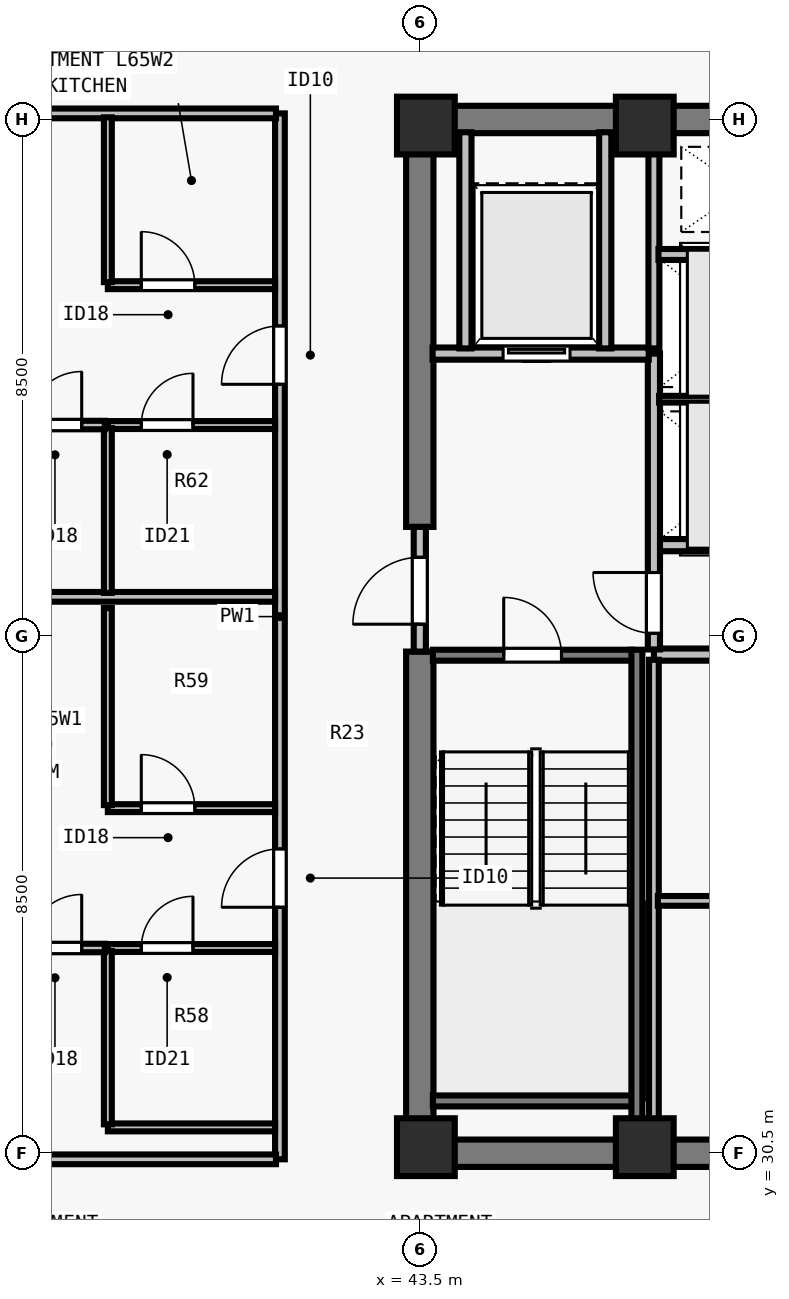
"""IFC4 building model, lengths in metres.
Left out: names, types, materials, properties, quantities, classifications, styles, units other than length and angle.
Written with IfcOpenShell. Run it as: python <this file> out.ifc"""

import sys

from ifc_helpers import new_model, si_unit, direction, frame, frame_2d, origin, origin_2d, place, context, subcontext, project, spatial, rectangle, extrude, element, fill, save


model = new_model("IFC4")
c1 = context("Model", 3, precision=1e-05, world=origin(), true_north=direction((0.0, 1.0)))
c2 = subcontext(c1, "Body", "Model", "MODEL_VIEW")
j1 = project(units=[si_unit("LENGTHUNIT", "METRE"), si_unit("PLANEANGLEUNIT", "RADIAN")], contexts=[c1])
p1 = place(None, origin())
s1 = spatial("IfcSite", under=j1, at=p1, CompositionType="ELEMENT")
p2 = place(p1, origin())
s2 = spatial("IfcBuilding", under=s1, at=p2, CompositionType="ELEMENT")
p3 = place(p2, frame((0.0, 0.0, 237.5)))
s3 = spatial("IfcBuildingStorey", under=s2, at=p3, CompositionType="ELEMENT", Elevation=237.5)
for number, where, z_axis, x_axis in (
    (1, (43.6, 30.6, 0.0), (0.0, 0.0, 1.0), (1.0, 0.0, 0.0)),
    (2, (47.2, 30.6, 0.0), (0.0, 0.0, 1.0), (1.0, 0.0, 0.0)),
    (3, (43.6, 47.4, 0.0), (0.0, 0.0, 1.0), (1.0, 0.0, 0.0)),
    (4, (47.2, 47.4, 0.0), (0.0, 0.0, 1.0), (1.0, 0.0, 0.0)),
):
    element("IfcColumn", number, at=place(p3, frame(where, z_axis=z_axis, x_axis=x_axis)), inside=s3, PredefinedType="COLUMN", context=c2, shape_type="SweptSolid", body=[
        extrude(rectangle(XDim=0.95, YDim=0.95, at=origin_2d()), origin(), (0.0, 0.0, 1.0), 3.5),
    ])
for number, where, z_axis, x_axis in (
    (5, (43.275, 30.5, 0.0), (0.0, 0.0, 1.0), (1.0, 0.0, 0.0)),
    (6, (43.275, 47.5, 0.0), (0.0, 0.0, 1.0), (1.0, 0.0, 0.0)),
):
    element("IfcWall", number, at=place(p3, frame(where, z_axis=z_axis, x_axis=x_axis)), inside=s3, PredefinedType="SHEAR", context=c2, shape_type="SweptSolid", body=[
        extrude(rectangle(XDim=17.45, YDim=0.45, at=frame_2d((8.725, 0.0))), origin(), (0.0, 0.0, 1.0), 3.29),
    ])
p4 = place(p3, frame((43.5, 30.715, 0.0), z_axis=(0.0, 0.0, 1.0), x_axis=(0.0, 1.0, 0.0)))
e7 = element("IfcWall", 7, at=p4, inside=s3, PredefinedType="SHEAR", context=c2, shape_type="SweptSolid", body=[
    extrude(rectangle(XDim=8.035, YDim=0.45, at=frame_2d((4.018, 0.0))), origin(), (0.0, 0.0, 1.0), 3.29),
])
p5 = place(p3, frame((43.5, 40.8, 0.0), z_axis=(0.0, 0.0, 1.0), x_axis=(0.0, 1.0, 0.0)))
e8 = element("IfcWall", 8, at=p5, inside=s3, PredefinedType="SHEAR", context=c2, shape_type="SweptSolid", body=[
    extrude(rectangle(XDim=6.485, YDim=0.45, at=frame_2d((3.242, 0.0))), origin(), (0.0, 0.0, 1.0), 3.29),
])
for number, where, z_axis, x_axis in (
    (9, (47.35, 38.7, 0.0), (0.0, 0.0, 1.0), (1.0, 0.0, 0.0)),
    (10, (47.35, 40.5, 0.0), (0.0, 0.0, 1.0), (1.0, 0.0, 0.0)),
):
    element("IfcWall", number, at=place(p3, frame(where, z_axis=z_axis, x_axis=x_axis)), inside=s3, PredefinedType="SOLIDWALL", context=c2, shape_type="SweptSolid", body=[
        extrude(rectangle(XDim=2.95, YDim=0.2, at=frame_2d((1.475, 0.0))), origin(), (0.0, 0.0, 1.0), 3.29),
    ])
p6 = place(p3, frame((43.5, 38.75, 0.0), z_axis=(0.0, 0.0, 1.0), x_axis=(0.0, 1.0, 0.0)))
e11 = element("IfcWall", 11, at=p6, inside=s3, PredefinedType="SOLIDWALL", context=c2, shape_type="SweptSolid", body=[
    extrude(rectangle(XDim=2.05, YDim=0.2, at=frame_2d((1.025, 0.0))), origin(), (0.0, 0.0, 1.0), 3.29),
])
p7 = place(p6, frame((0.45, 0.0, 0.0)))
e12 = element("IfcOpeningElement", 12, at=p7, cuts=e11, PredefinedType="OPENING", context=c2, shape_type="SweptSolid", body=[
    extrude(rectangle(XDim=1.1, YDim=2.15, at=frame_2d((0.55, 1.075))), frame((0.0, 0.11, 0.0), z_axis=(0.0, -1.0, 0.0), x_axis=(1.0, 0.0, 0.0)), (0.0, 0.0, 1.0), 0.22),
])
p8 = place(p3, frame((47.35, 38.785, 0.0), z_axis=(0.0, 0.0, 1.0), x_axis=(0.0, 1.0, 0.0)))
e13 = element("IfcWall", 13, at=p8, inside=s3, PredefinedType="SOLIDWALL", context=c2, shape_type="SweptSolid", body=[
    extrude(rectangle(XDim=4.865, YDim=0.2, at=frame_2d((2.433, 0.0))), origin(), (0.0, 0.0, 1.0), 3.29),
])
p9 = place(p8, frame((0.265, 0.0, 0.0)))
e14 = element("IfcOpeningElement", 14, at=p9, cuts=e13, PredefinedType="OPENING", context=c2, shape_type="SweptSolid", body=[
    extrude(rectangle(XDim=1.0, YDim=2.15, at=frame_2d((0.5, 1.075))), frame((0.0, 0.11, 0.0), z_axis=(0.0, -1.0, 0.0), x_axis=(1.0, 0.0, 0.0)), (0.0, 0.0, 1.0), 0.22),
])
p10 = place(p3, frame((43.71, 43.65, 0.0), z_axis=(0.0, 0.0, 1.0), x_axis=(1.0, 0.0, 0.0)))
e15 = element("IfcWall", 15, at=p10, inside=s3, PredefinedType="SOLIDWALL", context=c2, shape_type="SweptSolid", body=[
    extrude(rectangle(XDim=3.555, YDim=0.2, at=frame_2d((1.777, 0.0))), origin(), (0.0, 0.0, 1.0), 3.29),
])
p11 = place(p10, frame((1.16, 0.0, 0.0)))
e16 = element("IfcOpeningElement", 16, at=p11, cuts=e15, PredefinedType="OPENING", context=c2, shape_type="SweptSolid", body=[
    extrude(rectangle(XDim=1.1, YDim=2.2, at=frame_2d((0.55, 1.1))), frame((0.0, 0.11, 0.0), z_axis=(0.0, -1.0, 0.0), x_axis=(1.0, 0.0, 0.0)), (0.0, 0.0, 1.0), 0.22),
])
for number, where, z_axis, x_axis in (
    (17, (46.55, 43.735, 0.0), (0.0, 0.0, 1.0), (0.0, 1.0, 0.0)),
    (18, (44.25, 43.735, 0.0), (0.0, 0.0, 1.0), (0.0, 1.0, 0.0)),
):
    element("IfcWall", number, at=place(p3, frame(where, z_axis=z_axis, x_axis=x_axis)), inside=s3, PredefinedType="SOLIDWALL", context=c2, shape_type="SweptSolid", body=[
        extrude(rectangle(XDim=3.555, YDim=0.2, at=frame_2d((1.777, 0.0))), origin(), (0.0, 0.0, 1.0), 3.29),
    ])
p12 = place(p3, frame((47.35, 30.71, 0.0), z_axis=(0.0, 0.0, 1.0), x_axis=(0.0, 1.0, 0.0)))
e19 = element("IfcWall", 19, at=p12, inside=s3, PredefinedType="PARTITIONING", context=c2, shape_type="SweptSolid", body=[
    extrude(rectangle(XDim=7.905, YDim=0.16, at=frame_2d((3.953, 0.0))), origin(), (0.0, 0.0, 1.0), 3.29),
])
p13 = place(p3, frame((47.415, 34.65, 0.0), z_axis=(0.0, 0.0, 1.0), x_axis=(1.0, 0.0, 0.0)))
e20 = element("IfcWall", 20, at=p13, inside=s3, PredefinedType="PARTITIONING", context=c2, shape_type="SweptSolid", body=[
    extrude(rectangle(XDim=2.8, YDim=0.16, at=frame_2d((1.4, 0.0))), origin(), (0.0, 0.0, 1.0), 3.29),
])
p14 = place(p3, frame((47.35, 43.735, 0.0), z_axis=(0.0, 0.0, 1.0), x_axis=(0.0, 1.0, 0.0)))
e21 = element("IfcWall", 21, at=p14, inside=s3, PredefinedType="SOLIDWALL", context=c2, shape_type="SweptSolid", body=[
    extrude(rectangle(XDim=3.555, YDim=0.18, at=frame_2d((1.777, 0.0))), origin(), (0.0, 0.0, 1.0), 3.29),
])
p15 = place(p3, frame((47.435, 42.9, 0.0), z_axis=(0.0, 0.0, 1.0), x_axis=(1.0, 0.0, 0.0)))
e22 = element("IfcWall", 22, at=p15, inside=s3, PredefinedType="PARTITIONING", context=c2, shape_type="SweptSolid", body=[
    extrude(rectangle(XDim=2.78, YDim=0.11, at=frame_2d((1.39, 0.0))), origin(), (0.0, 0.0, 1.0), 3.29),
])
p16 = place(p3, frame((47.425, 45.28, 0.0), z_axis=(0.0, 0.0, 1.0), x_axis=(1.0, 0.0, 0.0)))
e23 = element("IfcWall", 23, at=p16, inside=s3, PredefinedType="SOLIDWALL", context=c2, shape_type="SweptSolid", body=[
    extrude(rectangle(XDim=2.79, YDim=0.18, at=frame_2d((1.395, 0.0))), origin(), (0.0, 0.0, 1.0), 3.29),
])
p17 = place(p3, frame((41.2, 30.4, 0.0), z_axis=(0.0, 0.0, 1.0), x_axis=(0.0, 1.0, 0.0)))
e24 = element("IfcWall", 24, at=p17, inside=s3, PredefinedType="PARTITIONING", context=c2, shape_type="SweptSolid", body=[
    extrude(rectangle(XDim=17.2, YDim=0.16, at=frame_2d((8.6, 0.0))), origin(), (0.0, 0.0, 1.0), 3.29),
])
p18 = place(p17, frame((4.145, 0.0, 0.0)))
e25 = element("IfcOpeningElement", 25, at=p18, cuts=e24, PredefinedType="OPENING", context=c2, shape_type="SweptSolid", body=[
    extrude(rectangle(XDim=0.96, YDim=2.18, at=frame_2d((0.48, 1.09))), frame((0.0, 0.09, 0.0), z_axis=(0.0, -1.0, 0.0), x_axis=(1.0, 0.0, 0.0)), (0.0, 0.0, 1.0), 0.18),
])
p19 = place(p17, frame((12.745, 0.0, 0.0)))
e26 = element("IfcOpeningElement", 26, at=p19, cuts=e24, PredefinedType="OPENING", context=c2, shape_type="SweptSolid", body=[
    extrude(rectangle(XDim=0.96, YDim=2.18, at=frame_2d((0.48, 1.09))), frame((0.0, 0.09, 0.0), z_axis=(0.0, -1.0, 0.0), x_axis=(1.0, 0.0, 0.0)), (0.0, 0.0, 1.0), 0.18),
])
for number, where, z_axis, x_axis in (
    (27, (29.805, 30.4, 0.0), (0.0, 0.0, 1.0), (1.0, 0.0, 0.0)),
    (28, (29.805, 47.6, 0.0), (0.0, 0.0, 1.0), (1.0, 0.0, 0.0)),
):
    element("IfcWall", number, at=place(p3, frame(where, z_axis=z_axis, x_axis=x_axis)), inside=s3, PredefinedType="PARTITIONING", context=c2, shape_type="SweptSolid", body=[
        extrude(rectangle(XDim=11.33, YDim=0.16, at=frame_2d((5.665, 0.0))), origin(), (0.0, 0.0, 1.0), 3.29),
    ])
p20 = place(p3, frame((29.77, 39.65, 0.0), z_axis=(0.0, 0.0, 1.0), x_axis=(1.0, 0.0, 0.0)))
e29 = element("IfcWall", 29, at=p20, inside=s3, PredefinedType="PARTITIONING", context=c2, shape_type="SweptSolid", body=[
    extrude(rectangle(XDim=11.35, YDim=0.16, at=frame_2d((5.675, 0.0))), origin(), (0.0, 0.0, 1.0), 2.958),
])
p21 = place(p3, frame((38.37, 30.925, 0.0), z_axis=(0.0, 0.0, 1.0), x_axis=(1.0, 0.0, 0.0)))
e30 = element("IfcWall", 30, at=p21, inside=s3, PredefinedType="PLUMBINGWALL", context=c2, shape_type="SweptSolid", body=[
    extrude(rectangle(XDim=2.75, YDim=0.13, at=frame_2d((1.375, 0.0))), origin(), (0.0, 0.0, 1.0), 3.29),
])
p22 = place(p3, frame((38.37, 33.875, 0.0), z_axis=(0.0, 0.0, 1.0), x_axis=(1.0, 0.0, 0.0)))
e31 = element("IfcWall", 31, at=p22, inside=s3, PredefinedType="PLUMBINGWALL", context=c2, shape_type="SweptSolid", body=[
    extrude(rectangle(XDim=2.75, YDim=0.13, at=frame_2d((1.375, 0.0))), origin(), (0.0, 0.0, 1.0), 3.29),
])
p23 = place(p22, frame((0.55, 0.0, 0.0)))
e32 = element("IfcOpeningElement", 32, at=p23, cuts=e31, PredefinedType="OPENING", context=c2, shape_type="SweptSolid", body=[
    extrude(rectangle(XDim=0.85, YDim=2.08, at=frame_2d((0.425, 1.04))), frame((0.0, 0.075, 0.0), z_axis=(0.0, -1.0, 0.0), x_axis=(1.0, 0.0, 0.0)), (0.0, 0.0, 1.0), 0.15),
])
p24 = place(p3, frame((38.37, 30.975, 0.0), z_axis=(0.0, 0.0, 1.0), x_axis=(0.0, 1.0, 0.0)))
e33 = element("IfcWall", 33, at=p24, inside=s3, PredefinedType="PLUMBINGWALL", context=c2, shape_type="SweptSolid", body=[
    extrude(rectangle(XDim=2.85, YDim=0.13, at=frame_2d((1.425, 0.0))), origin(), (0.0, 0.0, 1.0), 3.29),
])
p25 = place(p3, frame((38.37, 36.175, 0.0), z_axis=(0.0, 0.0, 1.0), x_axis=(1.0, 0.0, 0.0)))
e34 = element("IfcWall", 34, at=p25, inside=s3, PredefinedType="PLUMBINGWALL", context=c2, shape_type="SweptSolid", body=[
    extrude(rectangle(XDim=2.75, YDim=0.13, at=frame_2d((1.375, 0.0))), origin(), (0.0, 0.0, 1.0), 3.29),
])
p26 = place(p25, frame((0.55, 0.0, 0.0)))
e35 = element("IfcOpeningElement", 35, at=p26, cuts=e34, PredefinedType="OPENING", context=c2, shape_type="SweptSolid", body=[
    extrude(rectangle(XDim=0.88, YDim=2.1, at=frame_2d((0.44, 1.05))), frame((0.0, 0.075, 0.0), z_axis=(0.0, -1.0, 0.0), x_axis=(1.0, 0.0, 0.0)), (0.0, 0.0, 1.0), 0.15),
])
p27 = place(p3, frame((38.37, 36.225, 0.0), z_axis=(0.0, 0.0, 1.0), x_axis=(0.0, 1.0, 0.0)))
e36 = element("IfcWall", 36, at=p27, inside=s3, PredefinedType="PLUMBINGWALL", context=c2, shape_type="SweptSolid", body=[
    extrude(rectangle(XDim=3.24, YDim=0.13, at=frame_2d((1.62, 0.0))), origin(), (0.0, 0.0, 1.0), 3.29),
])
p28 = place(p3, frame((29.88, 33.875, 0.0), z_axis=(0.0, 0.0, 1.0), x_axis=(1.0, 0.0, 0.0)))
e37 = element("IfcWall", 37, at=p28, inside=s3, PredefinedType="PARTITIONING", context=c2, shape_type="SweptSolid", body=[
    extrude(rectangle(XDim=8.44, YDim=0.14, at=frame_2d((4.22, 0.0))), origin(), (0.0, 0.0, 1.0), 2.573),
])
p29 = place(p28, frame((7.18, 0.0, 0.0)))
e38 = element("IfcOpeningElement", 38, at=p29, cuts=e37, PredefinedType="OPENING", context=c2, shape_type="SweptSolid", body=[
    extrude(rectangle(XDim=0.88, YDim=2.1, at=frame_2d((0.44, 1.05))), frame((0.0, 0.08, 0.0), z_axis=(0.0, -1.0, 0.0), x_axis=(1.0, 0.0, 0.0)), (0.0, 0.0, 1.0), 0.16),
])
p30 = place(p3, frame((38.37, 42.475, 0.0), z_axis=(0.0, 0.0, 1.0), x_axis=(1.0, 0.0, 0.0)))
e39 = element("IfcWall", 39, at=p30, inside=s3, PredefinedType="PLUMBINGWALL", context=c2, shape_type="SweptSolid", body=[
    extrude(rectangle(XDim=2.75, YDim=0.13, at=frame_2d((1.375, 0.0))), origin(), (0.0, 0.0, 1.0), 2.958),
])
p31 = place(p30, frame((0.55, 0.0, 0.0)))
e40 = element("IfcOpeningElement", 40, at=p31, cuts=e39, PredefinedType="OPENING", context=c2, shape_type="SweptSolid", body=[
    extrude(rectangle(XDim=0.85, YDim=2.08, at=frame_2d((0.425, 1.04))), frame((0.0, 0.075, 0.0), z_axis=(0.0, -1.0, 0.0), x_axis=(1.0, 0.0, 0.0)), (0.0, 0.0, 1.0), 0.15),
])
p32 = place(p3, frame((38.37, 39.715, 0.0), z_axis=(0.0, 0.0, 1.0), x_axis=(0.0, 1.0, 0.0)))
e41 = element("IfcWall", 41, at=p32, inside=s3, PredefinedType="PLUMBINGWALL", context=c2, shape_type="SweptSolid", body=[
    extrude(rectangle(XDim=2.71, YDim=0.13, at=frame_2d((1.355, 0.0))), origin(), (0.0, 0.0, 1.0), 3.29),
])
p33 = place(p3, frame((38.37, 44.775, 0.0), z_axis=(0.0, 0.0, 1.0), x_axis=(1.0, 0.0, 0.0)))
e42 = element("IfcWall", 42, at=p33, inside=s3, PredefinedType="PLUMBINGWALL", context=c2, shape_type="SweptSolid", body=[
    extrude(rectangle(XDim=2.75, YDim=0.13, at=frame_2d((1.375, 0.0))), origin(), (0.0, 0.0, 1.0), 2.958),
])
p34 = place(p33, frame((0.55, 0.0, 0.0)))
e43 = element("IfcOpeningElement", 43, at=p34, cuts=e42, PredefinedType="OPENING", context=c2, shape_type="SweptSolid", body=[
    extrude(rectangle(XDim=0.88, YDim=2.1, at=frame_2d((0.44, 1.05))), frame((0.0, 0.075, 0.0), z_axis=(0.0, -1.0, 0.0), x_axis=(1.0, 0.0, 0.0)), (0.0, 0.0, 1.0), 0.15),
])
p35 = place(p3, frame((38.37, 44.825, 0.0), z_axis=(0.0, 0.0, 1.0), x_axis=(0.0, 1.0, 0.0)))
e44 = element("IfcWall", 44, at=p35, inside=s3, PredefinedType="PLUMBINGWALL", context=c2, shape_type="SweptSolid", body=[
    extrude(rectangle(XDim=2.71, YDim=0.13, at=frame_2d((1.355, 0.0))), origin(), (0.0, 0.0, 1.0), 3.29),
])
p36 = place(p3, frame((29.88, 42.475, 0.0), z_axis=(0.0, 0.0, 1.0), x_axis=(1.0, 0.0, 0.0)))
e45 = element("IfcWall", 45, at=p36, inside=s3, PredefinedType="PARTITIONING", context=c2, shape_type="SweptSolid", body=[
    extrude(rectangle(XDim=8.44, YDim=0.14, at=frame_2d((4.22, 0.0))), origin(), (0.0, 0.0, 1.0), 3.29),
])
p37 = place(p36, frame((7.18, 0.0, 0.0)))
e46 = element("IfcOpeningElement", 46, at=p37, cuts=e45, PredefinedType="OPENING", context=c2, shape_type="SweptSolid", body=[
    extrude(rectangle(XDim=0.88, YDim=2.1, at=frame_2d((0.44, 1.05))), frame((0.0, 0.08, 0.0), z_axis=(0.0, -1.0, 0.0), x_axis=(1.0, 0.0, 0.0)), (0.0, 0.0, 1.0), 0.16),
])
p38 = place(p3, frame((43.715, 38.69, 0.0), z_axis=(0.0, 0.0, 1.0), x_axis=(1.0, 0.0, 0.0)))
e47 = element("IfcWall", 47, at=p38, inside=s3, PredefinedType="SOLIDWALL", context=c2, shape_type="SweptSolid", body=[
    extrude(rectangle(XDim=3.28, YDim=0.18, at=frame_2d((1.64, 0.0))), origin(), (0.0, 0.0, 1.0), 3.29),
])
p39 = place(p38, frame((1.165, 0.0, 0.0)))
e48 = element("IfcOpeningElement", 48, at=p39, cuts=e47, PredefinedType="OPENING", context=c2, shape_type="SweptSolid", body=[
    extrude(rectangle(XDim=0.95, YDim=2.15, at=frame_2d((0.475, 1.075))), frame((0.0, 0.1, 0.0), z_axis=(0.0, -1.0, 0.0), x_axis=(1.0, 0.0, 0.0)), (0.0, 0.0, 1.0), 0.2),
])
p40 = place(p3, frame((43.715, 31.36, 0.0), z_axis=(0.0, 0.0, 1.0), x_axis=(1.0, 0.0, 0.0)))
e49 = element("IfcWall", 49, at=p40, inside=s3, PredefinedType="SOLIDWALL", context=c2, shape_type="SweptSolid", body=[
    extrude(rectangle(XDim=3.28, YDim=0.18, at=frame_2d((1.64, 0.0))), origin(), (0.0, 0.0, 1.0), 3.29),
])
p41 = place(p3, frame((47.07, 38.78, 0.0), z_axis=(0.0, 0.0, 1.0), x_axis=(0.0, -1.0, 0.0)))
e50 = element("IfcWall", 50, at=p41, inside=s3, PredefinedType="SOLIDWALL", context=c2, shape_type="SweptSolid", body=[
    extrude(rectangle(XDim=8.067, YDim=0.18, at=frame_2d((4.034, 0.0))), origin(), (0.0, 0.0, 1.0), 3.29),
])
p42 = place(p7, origin())
e51 = element("IfcDoor", 51, at=p42, inside=s3, OperationType="SINGLE_SWING_LEFT", PredefinedType="DOOR", context=c2, shape_type="SweptSolid", body=[
    extrude(rectangle(XDim=1.1, YDim=2.15, at=frame_2d((0.55, 1.075))), frame((0.0, 0.025, 0.0), z_axis=(0.0, -1.0, 0.0), x_axis=(1.0, 0.0, 0.0)), (0.0, 0.0, 1.0), 0.05),
])
fill(e12, e51)
p43 = place(p9, origin())
e52 = element("IfcDoor", 52, at=p43, inside=s3, OperationType="SINGLE_SWING_RIGHT", PredefinedType="DOOR", context=c2, shape_type="SweptSolid", body=[
    extrude(rectangle(XDim=1.0, YDim=2.15, at=frame_2d((0.5, 1.075))), frame((0.0, 0.025, 0.0), z_axis=(0.0, -1.0, 0.0), x_axis=(1.0, 0.0, 0.0)), (0.0, 0.0, 1.0), 0.05),
])
fill(e14, e52)
p44 = place(p11, origin())
e53 = element("IfcDoor", 53, at=p44, inside=s3, OperationType="SLIDING_TO_LEFT", PredefinedType="DOOR", context=c2, shape_type="SweptSolid", body=[
    extrude(rectangle(XDim=1.1, YDim=2.2, at=frame_2d((0.55, 1.1))), frame((0.0, 0.025, 0.0), z_axis=(0.0, -1.0, 0.0), x_axis=(1.0, 0.0, 0.0)), (0.0, 0.0, 1.0), 0.05),
])
fill(e16, e53)
p45 = place(p23, origin())
e54 = element("IfcDoor", 54, at=p45, inside=s3, OperationType="SINGLE_SWING_RIGHT", PredefinedType="DOOR", context=c2, shape_type="SweptSolid", body=[
    extrude(rectangle(XDim=0.85, YDim=2.08, at=frame_2d((0.425, 1.04))), frame((0.0, 0.025, 0.0), z_axis=(0.0, -1.0, 0.0), x_axis=(1.0, 0.0, 0.0)), (0.0, 0.0, 1.0), 0.05),
])
fill(e32, e54)
p46 = place(p26, origin())
e55 = element("IfcDoor", 55, at=p46, inside=s3, OperationType="SINGLE_SWING_LEFT", PredefinedType="DOOR", context=c2, shape_type="SweptSolid", body=[
    extrude(rectangle(XDim=0.88, YDim=2.1, at=frame_2d((0.44, 1.05))), frame((0.0, 0.025, 0.0), z_axis=(0.0, -1.0, 0.0), x_axis=(1.0, 0.0, 0.0)), (0.0, 0.0, 1.0), 0.05),
])
fill(e35, e55)
p47 = place(p29, origin())
e56 = element("IfcDoor", 56, at=p47, inside=s3, OperationType="SINGLE_SWING_RIGHT", PredefinedType="DOOR", context=c2, shape_type="SweptSolid", body=[
    extrude(rectangle(XDim=0.88, YDim=2.1, at=frame_2d((0.44, 1.05))), frame((0.0, 0.025, 0.0), z_axis=(0.0, -1.0, 0.0), x_axis=(1.0, 0.0, 0.0)), (0.0, 0.0, 1.0), 0.05),
])
fill(e38, e56)
p48 = place(p18, origin())
e57 = element("IfcDoor", 57, at=p48, inside=s3, OperationType="SINGLE_SWING_LEFT", PredefinedType="DOOR", context=c2, shape_type="SweptSolid", body=[
    extrude(rectangle(XDim=0.96, YDim=2.18, at=frame_2d((0.48, 1.09))), frame((0.0, 0.025, 0.0), z_axis=(0.0, -1.0, 0.0), x_axis=(1.0, 0.0, 0.0)), (0.0, 0.0, 1.0), 0.05),
])
fill(e25, e57)
p49 = place(p31, origin())
e58 = element("IfcDoor", 58, at=p49, inside=s3, OperationType="SINGLE_SWING_RIGHT", PredefinedType="DOOR", context=c2, shape_type="SweptSolid", body=[
    extrude(rectangle(XDim=0.85, YDim=2.08, at=frame_2d((0.425, 1.04))), frame((0.0, 0.025, 0.0), z_axis=(0.0, -1.0, 0.0), x_axis=(1.0, 0.0, 0.0)), (0.0, 0.0, 1.0), 0.05),
])
fill(e40, e58)
p50 = place(p34, origin())
e59 = element("IfcDoor", 59, at=p50, inside=s3, OperationType="SINGLE_SWING_LEFT", PredefinedType="DOOR", context=c2, shape_type="SweptSolid", body=[
    extrude(rectangle(XDim=0.88, YDim=2.1, at=frame_2d((0.44, 1.05))), frame((0.0, 0.025, 0.0), z_axis=(0.0, -1.0, 0.0), x_axis=(1.0, 0.0, 0.0)), (0.0, 0.0, 1.0), 0.05),
])
fill(e43, e59)
p51 = place(p37, origin())
e60 = element("IfcDoor", 60, at=p51, inside=s3, OperationType="SINGLE_SWING_RIGHT", PredefinedType="DOOR", context=c2, shape_type="SweptSolid", body=[
    extrude(rectangle(XDim=0.88, YDim=2.1, at=frame_2d((0.44, 1.05))), frame((0.0, 0.025, 0.0), z_axis=(0.0, -1.0, 0.0), x_axis=(1.0, 0.0, 0.0)), (0.0, 0.0, 1.0), 0.05),
])
fill(e46, e60)
p52 = place(p19, origin())
e61 = element("IfcDoor", 61, at=p52, inside=s3, OperationType="SINGLE_SWING_LEFT", PredefinedType="DOOR", context=c2, shape_type="SweptSolid", body=[
    extrude(rectangle(XDim=0.96, YDim=2.18, at=frame_2d((0.48, 1.09))), frame((0.0, 0.025, 0.0), z_axis=(0.0, -1.0, 0.0), x_axis=(1.0, 0.0, 0.0)), (0.0, 0.0, 1.0), 0.05),
])
fill(e26, e61)
p53 = place(p39, origin())
e62 = element("IfcDoor", 62, at=p53, inside=s3, OperationType="SINGLE_SWING_LEFT", PredefinedType="DOOR", context=c2, shape_type="SweptSolid", body=[
    extrude(rectangle(XDim=0.95, YDim=2.15, at=frame_2d((0.475, 1.075))), frame((0.0, 0.025, 0.0), z_axis=(0.0, -1.0, 0.0), x_axis=(1.0, 0.0, 0.0)), (0.0, 0.0, 1.0), 0.05),
])
fill(e48, e62)
save(model, sys.argv[1])
